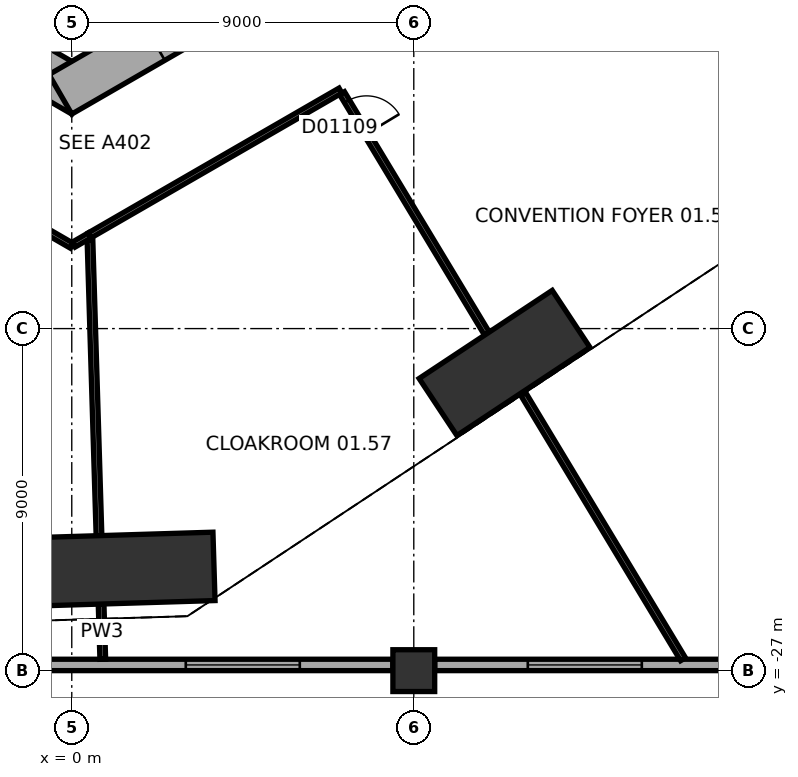
"""IFC4 building model, lengths in metres.
Left out: names, types, materials, properties, quantities, classifications, styles, units other than length and angle.
Written with IfcOpenShell. Run it as: python <this file> out.ifc"""

import sys

from ifc_helpers import new_model, si_unit, direction, frame, frame_2d, origin, origin_2d, place, context, subcontext, project, spatial, rectangle, extrude, element, fill, save


model = new_model("IFC4")
c1 = context("Model", 3, precision=1e-05, world=origin(), true_north=direction((0.0, 1.0)))
c2 = subcontext(c1, "Body", "Model", "MODEL_VIEW")
j1 = project(units=[si_unit("LENGTHUNIT", "METRE"), si_unit("PLANEANGLEUNIT", "RADIAN")], contexts=[c1])
p1 = place(None, origin())
s1 = spatial("IfcSite", under=j1, at=p1, CompositionType="ELEMENT")
p2 = place(p1, origin())
s2 = spatial("IfcBuilding", under=s1, at=p2, CompositionType="ELEMENT")
p3 = place(p2, frame((0.0, 0.0, 7.5)))
s3 = spatial("IfcBuildingStorey", under=s2, at=p3, CompositionType="ELEMENT", Elevation=7.5)
p4 = place(p3, frame((0.744, -24.348, 0.0), z_axis=(0.0, 0.0, 1.0), x_axis=(0.999533484231, 0.03054200224, 0.0)))
e1 = element("IfcColumn", 1, at=p4, inside=s3, PredefinedType="COLUMN", context=c2, shape_type="SweptSolid", body=[
    extrude(rectangle(XDim=6.0, YDim=1.8, at=origin_2d()), origin(), (0.0, 0.0, 1.0), 5.5),
])
p5 = place(p3, frame((11.389, -18.905, 0.0), z_axis=(0.0, 0.0, 1.0), x_axis=(0.833880042151, 0.551945717714, 0.0)))
e2 = element("IfcColumn", 2, at=p5, inside=s3, PredefinedType="COLUMN", context=c2, shape_type="SweptSolid", body=[
    extrude(rectangle(XDim=4.2, YDim=1.8, at=origin_2d()), origin(), (0.0, 0.0, 1.0), 5.5),
])
p6 = place(p3, frame((9.0, -27.0, 0.0), z_axis=(0.0, 0.0, 1.0), x_axis=(1.0, 0.0, 0.0)))
e3 = element("IfcColumn", 3, at=p6, inside=s3, PredefinedType="COLUMN", context=c2, shape_type="SweptSolid", body=[
    extrude(rectangle(XDim=1.1, YDim=1.1, at=origin_2d()), origin(), (0.0, 0.0, 1.0), 5.5),
])
p7 = place(p3, frame((-10.4, -5.658, 0.0), z_axis=(0.0, 0.0, 1.0), x_axis=(0.866021384402, -0.500006961711, 0.0)))
e4 = element("IfcWall", 4, at=p7, inside=s3, PredefinedType="SHEAR", context=c2, shape_type="SweptSolid", body=[
    extrude(rectangle(XDim=12.355, YDim=1.2, at=frame_2d((6.178, 0.0))), origin(), (0.0, 0.0, 1.0), 5.5),
])
p8 = place(p7, frame((6.378, 0.0, 0.0)))
e5 = element("IfcOpeningElement", 5, at=p8, cuts=e4, PredefinedType="OPENING", context=c2, shape_type="SweptSolid", body=[
    extrude(rectangle(XDim=1.5, YDim=2.1, at=frame_2d((0.75, 1.05))), frame((0.0, 0.61, 0.0), z_axis=(0.0, -1.0, 0.0), x_axis=(1.0, 0.0, 0.0)), (0.0, 0.0, 1.0), 1.22),
])
p9 = place(p7, frame((3.228, 0.0, 0.0)))
e6 = element("IfcOpeningElement", 6, at=p9, cuts=e4, PredefinedType="OPENING", context=c2, shape_type="SweptSolid", body=[
    extrude(rectangle(XDim=0.9, YDim=2.1, at=frame_2d((0.45, 1.05))), frame((0.0, 0.61, 0.0), z_axis=(0.0, -1.0, 0.0), x_axis=(1.0, 0.0, 0.0)), (0.0, 0.0, 1.0), 1.22),
])
p10 = place(p3, frame((-0.3, -11.836, 0.0), z_axis=(0.0, 0.0, 1.0), x_axis=(0.866021384402, 0.500006961711, 0.0)))
e7 = element("IfcWall", 7, at=p10, inside=s3, PredefinedType="SHEAR", context=c2, shape_type="SweptSolid", body=[
    extrude(rectangle(XDim=12.355, YDim=1.2, at=frame_2d((6.178, 0.0))), origin(), (0.0, 0.0, 1.0), 5.5),
])
p11 = place(p10, frame((2.828, 0.0, 0.0)))
e8 = element("IfcOpeningElement", 8, at=p11, cuts=e7, PredefinedType="OPENING", context=c2, shape_type="SweptSolid", body=[
    extrude(rectangle(XDim=0.9, YDim=2.1, at=frame_2d((0.45, 1.05))), frame((0.0, 0.61, 0.0), z_axis=(0.0, -1.0, 0.0), x_axis=(1.0, 0.0, 0.0)), (0.0, 0.0, 1.0), 1.22),
])
p12 = place(p10, frame((5.428, 0.0, 0.0)))
e9 = element("IfcOpeningElement", 9, at=p12, cuts=e7, PredefinedType="OPENING", context=c2, shape_type="SweptSolid", body=[
    extrude(rectangle(XDim=0.9, YDim=2.1, at=frame_2d((0.45, 1.05))), frame((0.0, 0.61, 0.0), z_axis=(0.0, -1.0, 0.0), x_axis=(1.0, 0.0, 0.0)), (0.0, 0.0, 1.0), 1.22),
])
p13 = place(p10, frame((7.928, 0.0, 0.0)))
e10 = element("IfcOpeningElement", 10, at=p13, cuts=e7, PredefinedType="OPENING", context=c2, shape_type="SweptSolid", body=[
    extrude(rectangle(XDim=1.1, YDim=2.1, at=frame_2d((0.55, 1.05))), frame((0.0, 0.61, 0.0), z_axis=(0.0, -1.0, 0.0), x_axis=(1.0, 0.0, 0.0)), (0.0, 0.0, 1.0), 1.22),
])
p14 = place(p3, frame((-8.45, -26.85, 0.0), z_axis=(0.0, 0.0, 1.0), x_axis=(1.0, 0.0, 0.0)))
e11 = element("IfcWall", 11, at=p14, inside=s3, PredefinedType="STANDARD", context=c2, shape_type="SweptSolid", body=[
    extrude(rectangle(XDim=16.9, YDim=0.3, at=frame_2d((8.45, 0.0))), origin(), (0.0, 0.0, 1.0), 4.0),
])
p15 = place(p14, frame((2.45, 0.0, 1.0)))
e12 = element("IfcOpeningElement", 12, at=p15, cuts=e11, PredefinedType="OPENING", context=c2, shape_type="SweptSolid", body=[
    extrude(rectangle(XDim=3.0, YDim=2.6, at=frame_2d((1.5, 1.3))), frame((0.0, 0.16, 0.0), z_axis=(0.0, -1.0, 0.0), x_axis=(1.0, 0.0, 0.0)), (0.0, 0.0, 1.0), 0.32),
])
p16 = place(p14, frame((11.45, 0.0, 1.0)))
e13 = element("IfcOpeningElement", 13, at=p16, cuts=e11, PredefinedType="OPENING", context=c2, shape_type="SweptSolid", body=[
    extrude(rectangle(XDim=3.0, YDim=2.6, at=frame_2d((1.5, 1.3))), frame((0.0, 0.16, 0.0), z_axis=(0.0, -1.0, 0.0), x_axis=(1.0, 0.0, 0.0)), (0.0, 0.0, 1.0), 0.32),
])
p17 = place(p3, frame((9.55, -26.85, 0.0), z_axis=(0.0, 0.0, 1.0), x_axis=(1.0, 0.0, 0.0)))
e14 = element("IfcWall", 14, at=p17, inside=s3, PredefinedType="STANDARD", context=c2, shape_type="SweptSolid", body=[
    extrude(rectangle(XDim=16.9, YDim=0.3, at=frame_2d((8.45, 0.0))), origin(), (0.0, 0.0, 1.0), 4.0),
])
p18 = place(p17, frame((2.45, 0.0, 1.0)))
e15 = element("IfcOpeningElement", 15, at=p18, cuts=e14, PredefinedType="OPENING", context=c2, shape_type="SweptSolid", body=[
    extrude(rectangle(XDim=3.0, YDim=2.6, at=frame_2d((1.5, 1.3))), frame((0.0, 0.16, 0.0), z_axis=(0.0, -1.0, 0.0), x_axis=(1.0, 0.0, 0.0)), (0.0, 0.0, 1.0), 0.32),
])
p19 = place(p17, frame((11.45, 0.0, 1.0)))
e16 = element("IfcOpeningElement", 16, at=p19, cuts=e14, PredefinedType="OPENING", context=c2, shape_type="SweptSolid", body=[
    extrude(rectangle(XDim=3.0, YDim=2.6, at=frame_2d((1.5, 1.3))), frame((0.0, 0.16, 0.0), z_axis=(0.0, -1.0, 0.0), x_axis=(1.0, 0.0, 0.0)), (0.0, 0.0, 1.0), 0.32),
])
p20 = place(p3, frame((0.771, -25.248, 0.0), z_axis=(0.0, 0.0, 1.0), x_axis=(0.030584206332, -0.99953219374, 0.0)))
e17 = element("IfcWall", 17, at=p20, inside=s3, PredefinedType="PARTITIONING", context=c2, shape_type="SweptSolid", body=[
    extrude(rectangle(XDim=1.453, YDim=0.15, at=frame_2d((0.727, 0.0))), origin(), (0.0, 0.0, 1.0), 5.2),
])
p21 = place(p3, frame((11.879, -19.719, 0.0), z_axis=(0.0, 0.0, 1.0), x_axis=(0.516054476578, -0.856555764212, 0.0)))
e18 = element("IfcWall", 18, at=p21, inside=s3, PredefinedType="PARTITIONING", context=c2, shape_type="SweptSolid", body=[
    extrude(rectangle(XDim=8.149, YDim=0.15, at=frame_2d((4.075, 0.0))), origin(), (0.0, 0.0, 1.0), 5.2),
])
p22 = place(p3, frame((10.924, -18.133, 0.0), z_axis=(0.0, 0.0, 1.0), x_axis=(-0.516035715917, 0.856567066784, 0.0)))
e19 = element("IfcWall", 19, at=p22, inside=s3, PredefinedType="PARTITIONING", context=c2, shape_type="SweptSolid", body=[
    extrude(rectangle(XDim=7.387, YDim=0.15, at=frame_2d((3.693, 0.0))), origin(), (0.0, 0.0, 1.0), 5.2),
])
p23 = place(p22, frame((6.137, 0.0, 0.0)))
e20 = element("IfcOpeningElement", 20, at=p23, cuts=e19, PredefinedType="OPENING", context=c2, shape_type="SweptSolid", body=[
    extrude(rectangle(XDim=1.0, YDim=2.1, at=frame_2d((0.5, 1.05))), frame((0.0, 0.085, 0.0), z_axis=(0.0, -1.0, 0.0), x_axis=(1.0, 0.0, 0.0)), (0.0, 0.0, 1.0), 0.17),
])
p24 = place(p3, frame((0.0, -15.82, 0.0), z_axis=(0.0, 0.0, 1.0), x_axis=(-0.866018019704, 0.500012789385, 0.0)))
e21 = element("IfcWall", 21, at=p24, inside=s3, PredefinedType="PARTITIONING", context=c2, shape_type="SweptSolid", body=[
    extrude(rectangle(XDim=7.327, YDim=0.15, at=frame_2d((3.664, 0.0))), origin(), (0.0, 0.0, 1.0), 5.2),
])
p25 = place(p24, frame((5.527, 0.0, 0.0)))
e22 = element("IfcOpeningElement", 22, at=p25, cuts=e21, PredefinedType="OPENING", context=c2, shape_type="SweptSolid", body=[
    extrude(rectangle(XDim=1.2, YDim=2.1, at=frame_2d((0.6, 1.05))), frame((0.0, 0.085, 0.0), z_axis=(0.0, -1.0, 0.0), x_axis=(1.0, 0.0, 0.0)), (0.0, 0.0, 1.0), 0.17),
])
p26 = place(p3, frame((0.479, -15.665, 0.0), z_axis=(0.0, 0.0, 1.0), x_axis=(0.030535907252, -0.999533670453, 0.0)))
e23 = element("IfcWall", 23, at=p26, inside=s3, PredefinedType="PARTITIONING", context=c2, shape_type="SweptSolid", body=[
    extrude(rectangle(XDim=7.787, YDim=0.15, at=frame_2d((3.894, 0.0))), origin(), (0.0, 0.0, 1.0), 5.2),
])
p27 = place(p3, frame((0.475, -15.545, 0.0), z_axis=(0.0, 0.0, 1.0), x_axis=(0.866021168401, 0.500007335828, 0.0)))
e24 = element("IfcWall", 24, at=p27, inside=s3, PredefinedType="PARTITIONING", context=c2, shape_type="SweptSolid", body=[
    extrude(rectangle(XDim=7.616, YDim=0.15, at=frame_2d((3.808, 0.0))), origin(), (0.0, 0.0, 1.0), 5.2),
])
p28 = place(p3, frame((0.475, -15.545, 0.0), z_axis=(0.0, 0.0, 1.0), x_axis=(-0.865927594567, -0.50016937228, 0.0)))
e25 = element("IfcWall", 25, at=p28, inside=s3, PredefinedType="PARTITIONING", context=c2, shape_type="SweptSolid", body=[
    extrude(rectangle(XDim=0.489, YDim=0.15, at=frame_2d((0.244, 0.0))), origin(), (0.0, 0.0, 1.0), 5.2),
])
p29 = place(p16, origin())
e26 = element("IfcWindow", 26, at=p29, inside=s3, PartitioningType="SINGLE_PANEL", PredefinedType="WINDOW", context=c2, shape_type="SweptSolid", body=[
    extrude(rectangle(XDim=3.0, YDim=2.6, at=frame_2d((1.5, 1.3))), frame((0.0, 0.03, 0.0), z_axis=(0.0, -1.0, 0.0), x_axis=(1.0, 0.0, 0.0)), (0.0, 0.0, 1.0), 0.06),
])
fill(e13, e26)
p30 = place(p18, origin())
e27 = element("IfcWindow", 27, at=p30, inside=s3, PartitioningType="SINGLE_PANEL", PredefinedType="WINDOW", context=c2, shape_type="SweptSolid", body=[
    extrude(rectangle(XDim=3.0, YDim=2.6, at=frame_2d((1.5, 1.3))), frame((0.0, 0.03, 0.0), z_axis=(0.0, -1.0, 0.0), x_axis=(1.0, 0.0, 0.0)), (0.0, 0.0, 1.0), 0.06),
])
fill(e15, e27)
p31 = place(p23, origin())
e28 = element("IfcDoor", 28, at=p31, inside=s3, OperationType="SINGLE_SWING_LEFT", PredefinedType="DOOR", context=c2, shape_type="SweptSolid", body=[
    extrude(rectangle(XDim=1.0, YDim=2.1, at=frame_2d((0.5, 1.05))), frame((0.0, 0.025, 0.0), z_axis=(0.0, -1.0, 0.0), x_axis=(1.0, 0.0, 0.0)), (0.0, 0.0, 1.0), 0.05),
])
fill(e20, e28)
save(model, sys.argv[1])
